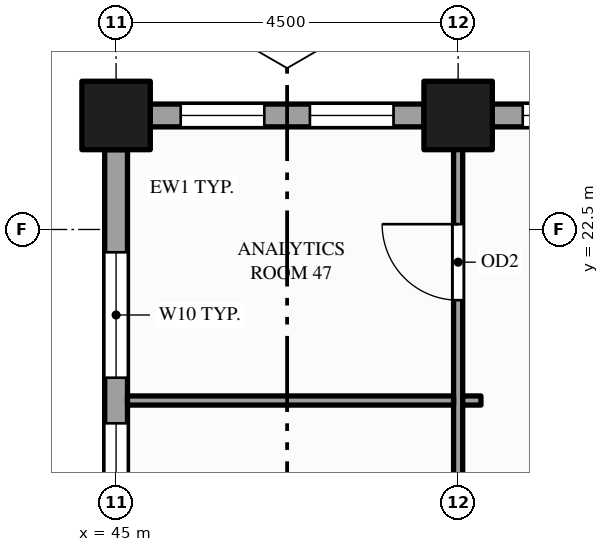
"""IFC4 building model, lengths in metres.
Left out: names, types, materials, properties, quantities, classifications, styles, units other than length and angle.
Written with IfcOpenShell. Run it as: python <this file> out.ifc"""

import sys

from ifc_helpers import new_model, si_unit, direction, frame, frame_2d, origin, origin_2d, place, context, subcontext, project, spatial, rectangle, hollow_rectangle, extrude, element, fill, save


model = new_model("IFC4")
c1 = context("Model", 3, precision=1e-05, world=origin(), true_north=direction((0.0, 1.0)))
c2 = subcontext(c1, "Body", "Model", "MODEL_VIEW")
j1 = project(units=[si_unit("LENGTHUNIT", "METRE"), si_unit("PLANEANGLEUNIT", "RADIAN")], contexts=[c1])
p1 = place(None, origin())
s1 = spatial("IfcSite", under=j1, at=p1, CompositionType="ELEMENT")
p2 = place(p1, origin())
s2 = spatial("IfcBuilding", under=s1, at=p2, CompositionType="ELEMENT")
p3 = place(p2, frame((0.0, 0.0, 139.0)))
s3 = spatial("IfcBuildingStorey", under=s2, at=p3, CompositionType="ELEMENT", Elevation=139.0)
for number, where, z_axis, x_axis in (
    (1, (45.0, 24.0, -0.15), (0.0, 0.0, 1.0), (1.0, 0.0, 0.0)),
    (2, (49.5, 24.0, -0.15), (0.0, 0.0, 1.0), (1.0, 0.0, 0.0)),
):
    element("IfcColumn", number, at=place(p3, frame(where, z_axis=z_axis, x_axis=x_axis)), inside=s3, PredefinedType="COLUMN", context=c2, shape_type="SweptSolid", body=[
        extrude(hollow_rectangle(XDim=0.9, YDim=0.9, WallThickness=0.045, at=origin_2d()), origin(), (0.0, 0.0, 1.0), 4.0),
    ])
p4 = place(p3, frame((53.55, 24.0, 0.0), z_axis=(0.0, 0.0, 1.0), x_axis=(-1.0, 0.0, 0.0)))
e3 = element("IfcWall", 3, at=p4, inside=s3, PredefinedType="STANDARD", context=c2, shape_type="SweptSolid", body=[
    extrude(rectangle(XDim=3.6, YDim=0.3, at=frame_2d((1.8, 0.0))), origin(), (0.0, 0.0, 1.0), 2.87),
])
p5 = place(p4, frame((0.4, 0.0, 0.9)))
e4 = element("IfcOpeningElement", 4, at=p5, cuts=e3, PredefinedType="OPENING", context=c2, shape_type="SweptSolid", body=[
    extrude(rectangle(XDim=1.1, YDim=1.75, at=frame_2d((0.55, 0.875))), frame((0.0, 0.16, 0.0), z_axis=(0.0, -1.0, 0.0), x_axis=(1.0, 0.0, 0.0)), (0.0, 0.0, 1.0), 0.32),
])
p6 = place(p4, frame((2.1, 0.0, 0.9)))
e5 = element("IfcOpeningElement", 5, at=p6, cuts=e3, PredefinedType="OPENING", context=c2, shape_type="SweptSolid", body=[
    extrude(rectangle(XDim=1.1, YDim=1.75, at=frame_2d((0.55, 0.875))), frame((0.0, 0.16, 0.0), z_axis=(0.0, -1.0, 0.0), x_axis=(1.0, 0.0, 0.0)), (0.0, 0.0, 1.0), 0.32),
])
p7 = place(p3, frame((49.05, 24.0, 0.0), z_axis=(0.0, 0.0, 1.0), x_axis=(-1.0, 0.0, 0.0)))
e6 = element("IfcWall", 6, at=p7, inside=s3, PredefinedType="STANDARD", context=c2, shape_type="SweptSolid", body=[
    extrude(rectangle(XDim=3.6, YDim=0.3, at=frame_2d((1.8, 0.0))), origin(), (0.0, 0.0, 1.0), 2.87),
])
p8 = place(p7, frame((0.4, 0.0, 0.9)))
e7 = element("IfcOpeningElement", 7, at=p8, cuts=e6, PredefinedType="OPENING", context=c2, shape_type="SweptSolid", body=[
    extrude(rectangle(XDim=1.1, YDim=1.75, at=frame_2d((0.55, 0.875))), frame((0.0, 0.16, 0.0), z_axis=(0.0, -1.0, 0.0), x_axis=(1.0, 0.0, 0.0)), (0.0, 0.0, 1.0), 0.32),
])
p9 = place(p7, frame((2.1, 0.0, 0.9)))
e8 = element("IfcOpeningElement", 8, at=p9, cuts=e6, PredefinedType="OPENING", context=c2, shape_type="SweptSolid", body=[
    extrude(rectangle(XDim=1.1, YDim=1.75, at=frame_2d((0.55, 0.875))), frame((0.0, 0.16, 0.0), z_axis=(0.0, -1.0, 0.0), x_axis=(1.0, 0.0, 0.0)), (0.0, 0.0, 1.0), 0.32),
])
p10 = place(p3, frame((45.0, 23.55, 0.0), z_axis=(0.0, 0.0, 1.0), x_axis=(0.0, -1.0, 0.0)))
e9 = element("IfcWall", 9, at=p10, inside=s3, PredefinedType="STANDARD", context=c2, shape_type="SweptSolid", body=[
    extrude(rectangle(XDim=21.6, YDim=0.3, at=frame_2d((10.8, 0.0))), origin(), (0.0, 0.0, 1.0), 3.149),
])
p11 = place(p10, frame((1.35, 0.0, 0.9)))
e10 = element("IfcOpeningElement", 10, at=p11, cuts=e9, PredefinedType="OPENING", context=c2, shape_type="SweptSolid", body=[
    extrude(rectangle(XDim=1.65, YDim=2.0, at=frame_2d((0.825, 1.0))), frame((0.0, 0.16, 0.0), z_axis=(0.0, -1.0, 0.0), x_axis=(1.0, 0.0, 0.0)), (0.0, 0.0, 1.0), 0.32),
])
p12 = place(p10, frame((3.6, 0.0, 0.9)))
e11 = element("IfcOpeningElement", 11, at=p12, cuts=e9, PredefinedType="OPENING", context=c2, shape_type="SweptSolid", body=[
    extrude(rectangle(XDim=1.65, YDim=2.0, at=frame_2d((0.825, 1.0))), frame((0.0, 0.16, 0.0), z_axis=(0.0, -1.0, 0.0), x_axis=(1.0, 0.0, 0.0)), (0.0, 0.0, 1.0), 0.32),
])
p13 = place(p10, frame((5.85, 0.0, 0.9)))
e12 = element("IfcOpeningElement", 12, at=p13, cuts=e9, PredefinedType="OPENING", context=c2, shape_type="SweptSolid", body=[
    extrude(rectangle(XDim=1.65, YDim=2.0, at=frame_2d((0.825, 1.0))), frame((0.0, 0.16, 0.0), z_axis=(0.0, -1.0, 0.0), x_axis=(1.0, 0.0, 0.0)), (0.0, 0.0, 1.0), 0.32),
])
p14 = place(p10, frame((8.1, 0.0, 0.9)))
e13 = element("IfcOpeningElement", 13, at=p14, cuts=e9, PredefinedType="OPENING", context=c2, shape_type="SweptSolid", body=[
    extrude(rectangle(XDim=1.65, YDim=2.0, at=frame_2d((0.825, 1.0))), frame((0.0, 0.16, 0.0), z_axis=(0.0, -1.0, 0.0), x_axis=(1.0, 0.0, 0.0)), (0.0, 0.0, 1.0), 0.32),
])
p15 = place(p10, frame((10.35, 0.0, 0.9)))
e14 = element("IfcOpeningElement", 14, at=p15, cuts=e9, PredefinedType="OPENING", context=c2, shape_type="SweptSolid", body=[
    extrude(rectangle(XDim=1.65, YDim=2.0, at=frame_2d((0.825, 1.0))), frame((0.0, 0.16, 0.0), z_axis=(0.0, -1.0, 0.0), x_axis=(1.0, 0.0, 0.0)), (0.0, 0.0, 1.0), 0.32),
])
p16 = place(p10, frame((12.6, 0.0, 0.9)))
e15 = element("IfcOpeningElement", 15, at=p16, cuts=e9, PredefinedType="OPENING", context=c2, shape_type="SweptSolid", body=[
    extrude(rectangle(XDim=1.65, YDim=2.0, at=frame_2d((0.825, 1.0))), frame((0.0, 0.16, 0.0), z_axis=(0.0, -1.0, 0.0), x_axis=(1.0, 0.0, 0.0)), (0.0, 0.0, 1.0), 0.32),
])
p17 = place(p10, frame((14.85, 0.0, 0.9)))
e16 = element("IfcOpeningElement", 16, at=p17, cuts=e9, PredefinedType="OPENING", context=c2, shape_type="SweptSolid", body=[
    extrude(rectangle(XDim=1.65, YDim=2.0, at=frame_2d((0.825, 1.0))), frame((0.0, 0.16, 0.0), z_axis=(0.0, -1.0, 0.0), x_axis=(1.0, 0.0, 0.0)), (0.0, 0.0, 1.0), 0.32),
])
p18 = place(p10, frame((17.1, 0.0, 0.9)))
e17 = element("IfcOpeningElement", 17, at=p18, cuts=e9, PredefinedType="OPENING", context=c2, shape_type="SweptSolid", body=[
    extrude(rectangle(XDim=1.65, YDim=2.0, at=frame_2d((0.825, 1.0))), frame((0.0, 0.16, 0.0), z_axis=(0.0, -1.0, 0.0), x_axis=(1.0, 0.0, 0.0)), (0.0, 0.0, 1.0), 0.32),
])
p19 = place(p10, frame((19.35, 0.0, 0.9)))
e18 = element("IfcOpeningElement", 18, at=p19, cuts=e9, PredefinedType="OPENING", context=c2, shape_type="SweptSolid", body=[
    extrude(rectangle(XDim=1.65, YDim=2.0, at=frame_2d((0.825, 1.0))), frame((0.0, 0.16, 0.0), z_axis=(0.0, -1.0, 0.0), x_axis=(1.0, 0.0, 0.0)), (0.0, 0.0, 1.0), 0.32),
])
p20 = place(p3, frame((49.5, 1.65, 0.0), z_axis=(0.0, 0.0, 1.0), x_axis=(0.0, 1.0, 0.0)))
e19 = element("IfcWall", 19, at=p20, inside=s3, PredefinedType="PARTITIONING", context=c2, shape_type="SweptSolid", body=[
    extrude(rectangle(XDim=22.2, YDim=0.12, at=frame_2d((11.1, 0.0))), origin(), (0.0, 0.0, 1.0), 2.87),
])
p21 = place(p20, frame((0.85, 0.0, 0.0)))
e20 = element("IfcOpeningElement", 20, at=p21, cuts=e19, PredefinedType="OPENING", context=c2, shape_type="SweptSolid", body=[
    extrude(rectangle(XDim=0.9, YDim=2.1, at=frame_2d((0.45, 1.05))), frame((0.0, 0.07, 0.0), z_axis=(0.0, -1.0, 0.0), x_axis=(1.0, 0.0, 0.0)), (0.0, 0.0, 1.0), 0.14),
])
p22 = place(p20, frame((3.525, 0.0, 0.0)))
e21 = element("IfcOpeningElement", 21, at=p22, cuts=e19, PredefinedType="OPENING", context=c2, shape_type="SweptSolid", body=[
    extrude(rectangle(XDim=0.9, YDim=2.1, at=frame_2d((0.45, 1.05))), frame((0.0, 0.07, 0.0), z_axis=(0.0, -1.0, 0.0), x_axis=(1.0, 0.0, 0.0)), (0.0, 0.0, 1.0), 0.14),
])
p23 = place(p20, frame((5.35, 0.0, 0.0)))
e22 = element("IfcOpeningElement", 22, at=p23, cuts=e19, PredefinedType="OPENING", context=c2, shape_type="SweptSolid", body=[
    extrude(rectangle(XDim=1.0, YDim=2.1, at=frame_2d((0.5, 1.05))), frame((0.0, 0.07, 0.0), z_axis=(0.0, -1.0, 0.0), x_axis=(1.0, 0.0, 0.0)), (0.0, 0.0, 1.0), 0.14),
])
p24 = place(p20, frame((10.225, 0.0, 0.0)))
e23 = element("IfcOpeningElement", 23, at=p24, cuts=e19, PredefinedType="OPENING", context=c2, shape_type="SweptSolid", body=[
    extrude(rectangle(XDim=1.0, YDim=2.1, at=frame_2d((0.5, 1.05))), frame((0.0, 0.07, 0.0), z_axis=(0.0, -1.0, 0.0), x_axis=(1.0, 0.0, 0.0)), (0.0, 0.0, 1.0), 0.14),
])
p25 = place(p20, frame((15.85, 0.0, 0.0)))
e24 = element("IfcOpeningElement", 24, at=p25, cuts=e19, PredefinedType="OPENING", context=c2, shape_type="SweptSolid", body=[
    extrude(rectangle(XDim=1.0, YDim=2.1, at=frame_2d((0.5, 1.05))), frame((0.0, 0.07, 0.0), z_axis=(0.0, -1.0, 0.0), x_axis=(1.0, 0.0, 0.0)), (0.0, 0.0, 1.0), 0.14),
])
p26 = place(p20, frame((19.92, 0.0, 0.0)))
e25 = element("IfcOpeningElement", 25, at=p26, cuts=e19, PredefinedType="OPENING", context=c2, shape_type="SweptSolid", body=[
    extrude(rectangle(XDim=1.0, YDim=2.1, at=frame_2d((0.5, 1.05))), frame((0.0, 0.07, 0.0), z_axis=(0.0, -1.0, 0.0), x_axis=(1.0, 0.0, 0.0)), (0.0, 0.0, 1.0), 0.14),
])
p27 = place(p3, frame((45.15, 20.25, 0.0), z_axis=(0.0, 0.0, 1.0), x_axis=(1.0, 0.0, 0.0)))
e26 = element("IfcWall", 26, at=p27, inside=s3, PredefinedType="PARTITIONING", context=c2, shape_type="SweptSolid", body=[
    extrude(rectangle(XDim=4.29, YDim=0.12, at=frame_2d((2.145, 0.0))), origin(), (0.0, 0.0, 1.0), 2.87),
])
p28 = place(p3, frame((49.56, 20.25, 0.0), z_axis=(0.0, 0.0, 1.0), x_axis=(1.0, 0.0, 0.0)))
e27 = element("IfcWall", 27, at=p28, inside=s3, PredefinedType="PARTITIONING", context=c2, shape_type="SweptSolid", body=[
    extrude(rectangle(XDim=0.24, YDim=0.12, at=frame_2d((0.12, 0.0))), origin(), (0.0, 0.0, 1.0), 2.87),
])
p29 = place(p6, origin())
e28 = element("IfcWindow", 28, at=p29, inside=s3, PartitioningType="SINGLE_PANEL", PredefinedType="WINDOW", context=c2, shape_type="SweptSolid", body=[
    extrude(rectangle(XDim=1.1, YDim=1.75, at=frame_2d((0.55, 0.875))), frame((0.0, 0.03, 0.0), z_axis=(0.0, -1.0, 0.0), x_axis=(1.0, 0.0, 0.0)), (0.0, 0.0, 1.0), 0.06),
])
fill(e5, e28)
p30 = place(p8, origin())
e29 = element("IfcWindow", 29, at=p30, inside=s3, PartitioningType="SINGLE_PANEL", PredefinedType="WINDOW", context=c2, shape_type="SweptSolid", body=[
    extrude(rectangle(XDim=1.1, YDim=1.75, at=frame_2d((0.55, 0.875))), frame((0.0, 0.03, 0.0), z_axis=(0.0, -1.0, 0.0), x_axis=(1.0, 0.0, 0.0)), (0.0, 0.0, 1.0), 0.06),
])
fill(e7, e29)
p31 = place(p9, origin())
e30 = element("IfcWindow", 30, at=p31, inside=s3, PartitioningType="SINGLE_PANEL", PredefinedType="WINDOW", context=c2, shape_type="SweptSolid", body=[
    extrude(rectangle(XDim=1.1, YDim=1.75, at=frame_2d((0.55, 0.875))), frame((0.0, 0.03, 0.0), z_axis=(0.0, -1.0, 0.0), x_axis=(1.0, 0.0, 0.0)), (0.0, 0.0, 1.0), 0.06),
])
fill(e8, e30)
p32 = place(p11, origin())
e31 = element("IfcWindow", 31, at=p32, inside=s3, PartitioningType="SINGLE_PANEL", PredefinedType="WINDOW", context=c2, shape_type="SweptSolid", body=[
    extrude(rectangle(XDim=1.65, YDim=2.0, at=frame_2d((0.825, 1.0))), frame((0.0, 0.03, 0.0), z_axis=(0.0, -1.0, 0.0), x_axis=(1.0, 0.0, 0.0)), (0.0, 0.0, 1.0), 0.06),
])
fill(e10, e31)
p33 = place(p12, origin())
e32 = element("IfcWindow", 32, at=p33, inside=s3, PartitioningType="SINGLE_PANEL", PredefinedType="WINDOW", context=c2, shape_type="SweptSolid", body=[
    extrude(rectangle(XDim=1.65, YDim=2.0, at=frame_2d((0.825, 1.0))), frame((0.0, 0.03, 0.0), z_axis=(0.0, -1.0, 0.0), x_axis=(1.0, 0.0, 0.0)), (0.0, 0.0, 1.0), 0.06),
])
fill(e11, e32)
p34 = place(p26, origin())
e33 = element("IfcDoor", 33, at=p34, inside=s3, OperationType="SINGLE_SWING_RIGHT", PredefinedType="DOOR", context=c2, shape_type="SweptSolid", body=[
    extrude(rectangle(XDim=1.0, YDim=2.1, at=frame_2d((0.5, 1.05))), frame((0.0, 0.025, 0.0), z_axis=(0.0, -1.0, 0.0), x_axis=(1.0, 0.0, 0.0)), (0.0, 0.0, 1.0), 0.05),
])
fill(e25, e33)
save(model, sys.argv[1])
